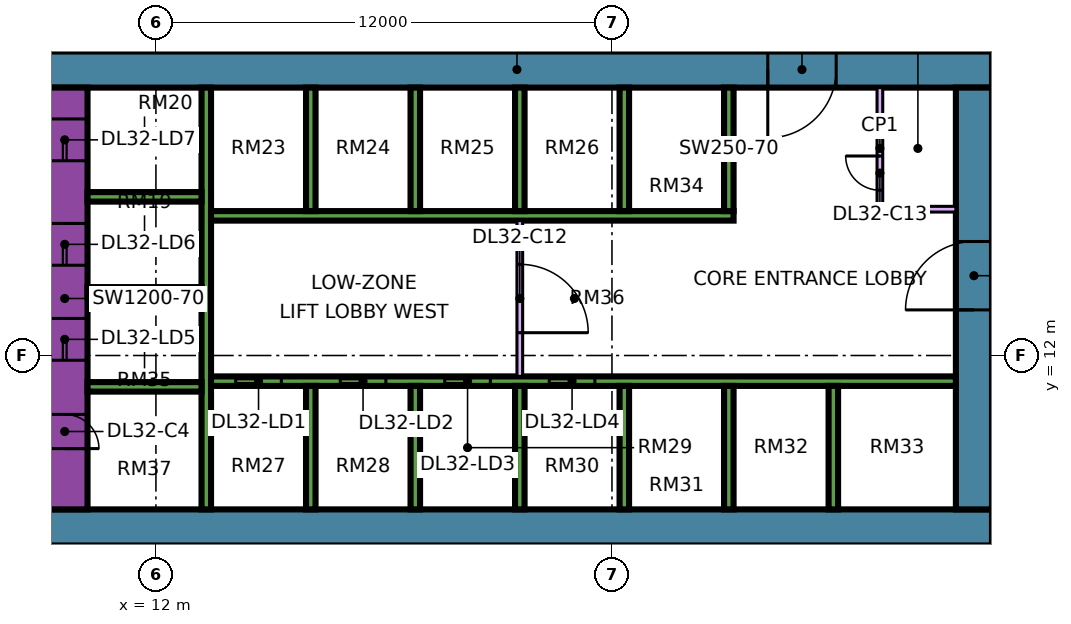
"""IFC4 building model, lengths in metres.
Left out: names, types, materials, properties, quantities, classifications, styles, units other than length and angle.
Written with IfcOpenShell. Run it as: python <this file> out.ifc"""

import sys

from ifc_helpers import new_model, si_unit, direction, frame, frame_2d, origin, place, context, subcontext, project, spatial, rectangle, extrude, element, fill, save


model = new_model("IFC4")
c1 = context("Model", 3, precision=1e-05, world=origin(), true_north=direction((0.0, 1.0)))
c2 = subcontext(c1, "Body", "Model", "MODEL_VIEW")
j1 = project(units=[si_unit("LENGTHUNIT", "METRE"), si_unit("PLANEANGLEUNIT", "RADIAN")], contexts=[c1])
p1 = place(None, origin())
s1 = spatial("IfcSite", under=j1, at=p1, CompositionType="ELEMENT")
p2 = place(p1, origin())
s2 = spatial("IfcBuilding", under=s1, at=p2, CompositionType="ELEMENT")
p3 = place(p2, frame((0.0, 0.0, 136.9)))
s3 = spatial("IfcBuildingStorey", under=s2, at=p3, CompositionType="ELEMENT", Elevation=136.9)
p4 = place(p3, frame((9.0, 7.475, 0.0), z_axis=(0.0, 0.0, 1.0), x_axis=(1.0, 0.0, 0.0)))
e1 = element("IfcWall", 1, at=p4, inside=s3, PredefinedType="SHEAR", context=c2, shape_type="SweptSolid", body=[
    extrude(rectangle(XDim=25.0, YDim=0.95, at=frame_2d((12.5, 0.0))), origin(), (0.0, 0.0, 1.0), 3.75),
])
p5 = place(p3, frame((9.0, 19.525, 0.0), z_axis=(0.0, 0.0, 1.0), x_axis=(1.0, 0.0, 0.0)))
e2 = element("IfcWall", 2, at=p5, inside=s3, PredefinedType="SHEAR", context=c2, shape_type="SweptSolid", body=[
    extrude(rectangle(XDim=25.0, YDim=0.95, at=frame_2d((12.5, 0.0))), origin(), (0.0, 0.0, 1.0), 3.75),
])
p6 = place(p5, frame((19.1, 0.0, 0.0)))
e3 = element("IfcOpeningElement", 3, at=p6, cuts=e2, PredefinedType="OPENING", context=c2, shape_type="SweptSolid", body=[
    extrude(rectangle(XDim=1.8, YDim=2.4, at=frame_2d((0.9, 1.2))), frame((0.0, 0.485, 0.0), z_axis=(0.0, -1.0, 0.0), x_axis=(1.0, 0.0, 0.0)), (0.0, 0.0, 1.0), 0.97),
])
p7 = place(p3, frame((9.6, 7.95, 0.0), z_axis=(0.0, 0.0, 1.0), x_axis=(0.0, 1.0, 0.0)))
e4 = element("IfcWall", 4, at=p7, inside=s3, PredefinedType="SHEAR", context=c2, shape_type="SweptSolid", body=[
    extrude(rectangle(XDim=11.1, YDim=1.2, at=frame_2d((5.55, 0.0))), origin(), (0.0, 0.0, 1.0), 3.75),
])
p8 = place(p7, frame((3.925, 0.0, 0.0)))
e5 = element("IfcOpeningElement", 5, at=p8, cuts=e4, PredefinedType="OPENING", context=c2, shape_type="SweptSolid", body=[
    extrude(rectangle(XDim=1.1, YDim=2.2, at=frame_2d((0.55, 1.1))), frame((0.0, 0.61, 0.0), z_axis=(0.0, -1.0, 0.0), x_axis=(1.0, 0.0, 0.0)), (0.0, 0.0, 1.0), 1.22),
])
p9 = place(p7, frame((6.425, 0.0, 0.0)))
e6 = element("IfcOpeningElement", 6, at=p9, cuts=e4, PredefinedType="OPENING", context=c2, shape_type="SweptSolid", body=[
    extrude(rectangle(XDim=1.1, YDim=2.2, at=frame_2d((0.55, 1.1))), frame((0.0, 0.61, 0.0), z_axis=(0.0, -1.0, 0.0), x_axis=(1.0, 0.0, 0.0)), (0.0, 0.0, 1.0), 1.22),
])
p10 = place(p7, frame((9.175, 0.0, 0.0)))
e7 = element("IfcOpeningElement", 7, at=p10, cuts=e4, PredefinedType="OPENING", context=c2, shape_type="SweptSolid", body=[
    extrude(rectangle(XDim=1.1, YDim=2.2, at=frame_2d((0.55, 1.1))), frame((0.0, 0.61, 0.0), z_axis=(0.0, -1.0, 0.0), x_axis=(1.0, 0.0, 0.0)), (0.0, 0.0, 1.0), 1.22),
])
p11 = place(p7, frame((1.6, 0.0, 0.0)))
e8 = element("IfcOpeningElement", 8, at=p11, cuts=e4, PredefinedType="OPENING", context=c2, shape_type="SweptSolid", body=[
    extrude(rectangle(XDim=0.9, YDim=2.1, at=frame_2d((0.45, 1.05))), frame((0.0, 0.61, 0.0), z_axis=(0.0, -1.0, 0.0), x_axis=(1.0, 0.0, 0.0)), (0.0, 0.0, 1.0), 1.22),
])
p12 = place(p3, frame((33.525, 7.95, 0.0), z_axis=(0.0, 0.0, 1.0), x_axis=(0.0, 1.0, 0.0)))
e9 = element("IfcWall", 9, at=p12, inside=s3, PredefinedType="SHEAR", context=c2, shape_type="SweptSolid", body=[
    extrude(rectangle(XDim=11.1, YDim=0.95, at=frame_2d((5.55, 0.0))), origin(), (0.0, 0.0, 1.0), 3.75),
])
p13 = place(p12, frame((5.25, 0.0, 0.0)))
e10 = element("IfcOpeningElement", 10, at=p13, cuts=e9, PredefinedType="OPENING", context=c2, shape_type="SweptSolid", body=[
    extrude(rectangle(XDim=1.8, YDim=2.4, at=frame_2d((0.9, 1.2))), frame((0.0, 0.485, 0.0), z_axis=(0.0, -1.0, 0.0), x_axis=(1.0, 0.0, 0.0)), (0.0, 0.0, 1.0), 0.97),
])
p14 = place(p3, frame((13.325, 7.95, 0.0), z_axis=(0.0, 0.0, 1.0), x_axis=(0.0, 1.0, 0.0)))
e11 = element("IfcWall", 11, at=p14, inside=s3, PredefinedType="SHEAR", context=c2, shape_type="SweptSolid", body=[
    extrude(rectangle(XDim=11.1, YDim=0.25, at=frame_2d((5.55, 0.0))), origin(), (0.0, 0.0, 1.0), 3.75),
])
p15 = place(p3, frame((13.45, 11.325, 0.0), z_axis=(0.0, 0.0, 1.0), x_axis=(1.0, 0.0, 0.0)))
e12 = element("IfcWall", 12, at=p15, inside=s3, PredefinedType="SHEAR", context=c2, shape_type="SweptSolid", body=[
    extrude(rectangle(XDim=19.6, YDim=0.25, at=frame_2d((9.8, 0.0))), origin(), (0.0, 0.0, 1.0), 3.75),
])
p16 = place(p15, frame((0.65, 0.0, 0.0)))
e13 = element("IfcOpeningElement", 13, at=p16, cuts=e12, PredefinedType="OPENING", context=c2, shape_type="SweptSolid", body=[
    extrude(rectangle(XDim=1.2, YDim=2.2, at=frame_2d((0.6, 1.1))), frame((0.0, 0.135, 0.0), z_axis=(0.0, -1.0, 0.0), x_axis=(1.0, 0.0, 0.0)), (0.0, 0.0, 1.0), 0.27),
])
p17 = place(p15, frame((3.4, 0.0, 0.0)))
e14 = element("IfcOpeningElement", 14, at=p17, cuts=e12, PredefinedType="OPENING", context=c2, shape_type="SweptSolid", body=[
    extrude(rectangle(XDim=1.2, YDim=2.2, at=frame_2d((0.6, 1.1))), frame((0.0, 0.135, 0.0), z_axis=(0.0, -1.0, 0.0), x_axis=(1.0, 0.0, 0.0)), (0.0, 0.0, 1.0), 0.27),
])
p18 = place(p15, frame((6.15, 0.0, 0.0)))
e15 = element("IfcOpeningElement", 15, at=p18, cuts=e12, PredefinedType="OPENING", context=c2, shape_type="SweptSolid", body=[
    extrude(rectangle(XDim=1.2, YDim=2.2, at=frame_2d((0.6, 1.1))), frame((0.0, 0.135, 0.0), z_axis=(0.0, -1.0, 0.0), x_axis=(1.0, 0.0, 0.0)), (0.0, 0.0, 1.0), 0.27),
])
p19 = place(p15, frame((8.9, 0.0, 0.0)))
e16 = element("IfcOpeningElement", 16, at=p19, cuts=e12, PredefinedType="OPENING", context=c2, shape_type="SweptSolid", body=[
    extrude(rectangle(XDim=1.2, YDim=2.2, at=frame_2d((0.6, 1.1))), frame((0.0, 0.135, 0.0), z_axis=(0.0, -1.0, 0.0), x_axis=(1.0, 0.0, 0.0)), (0.0, 0.0, 1.0), 0.27),
])
p20 = place(p3, frame((13.45, 15.675, 0.0), z_axis=(0.0, 0.0, 1.0), x_axis=(1.0, 0.0, 0.0)))
e17 = element("IfcWall", 17, at=p20, inside=s3, PredefinedType="SHEAR", context=c2, shape_type="SweptSolid", body=[
    extrude(rectangle(XDim=13.75, YDim=0.25, at=frame_2d((6.875, 0.0))), origin(), (0.0, 0.0, 1.0), 3.75),
])
for number, where, z_axis, x_axis in (
    (18, (10.2, 11.175, 0.0), (0.0, 0.0, 1.0), (1.0, 0.0, 0.0)),
    (19, (10.2, 13.675, 0.0), (0.0, 0.0, 1.0), (1.0, 0.0, 0.0)),
    (20, (10.2, 16.175, 0.0), (0.0, 0.0, 1.0), (1.0, 0.0, 0.0)),
):
    element("IfcWall", number, at=place(p3, frame(where, z_axis=z_axis, x_axis=x_axis)), inside=s3, PredefinedType="SHEAR", context=c2, shape_type="SweptSolid", body=[
        extrude(rectangle(XDim=3.0, YDim=0.25, at=frame_2d((1.5, 0.0))), origin(), (0.0, 0.0, 1.0), 3.75),
    ])
for number, where, z_axis, x_axis in (
    (21, (16.075, 7.95, 0.0), (0.0, 0.0, 1.0), (0.0, 1.0, 0.0)),
    (22, (18.825, 7.95, 0.0), (0.0, 0.0, 1.0), (0.0, 1.0, 0.0)),
    (23, (21.575, 7.95, 0.0), (0.0, 0.0, 1.0), (0.0, 1.0, 0.0)),
    (24, (24.325, 7.95, 0.0), (0.0, 0.0, 1.0), (0.0, 1.0, 0.0)),
    (25, (27.075, 7.95, 0.0), (0.0, 0.0, 1.0), (0.0, 1.0, 0.0)),
    (26, (29.825, 7.95, 0.0), (0.0, 0.0, 1.0), (0.0, 1.0, 0.0)),
    (27, (16.075, 15.8, 0.0), (0.0, 0.0, 1.0), (0.0, 1.0, 0.0)),
    (28, (18.825, 15.8, 0.0), (0.0, 0.0, 1.0), (0.0, 1.0, 0.0)),
    (29, (21.575, 15.8, 0.0), (0.0, 0.0, 1.0), (0.0, 1.0, 0.0)),
    (30, (24.325, 15.8, 0.0), (0.0, 0.0, 1.0), (0.0, 1.0, 0.0)),
    (31, (27.075, 15.8, 0.0), (0.0, 0.0, 1.0), (0.0, 1.0, 0.0)),
):
    element("IfcWall", number, at=place(p3, frame(where, z_axis=z_axis, x_axis=x_axis)), inside=s3, PredefinedType="SHEAR", context=c2, shape_type="SweptSolid", body=[
        extrude(rectangle(XDim=3.25, YDim=0.25, at=frame_2d((1.625, 0.0))), origin(), (0.0, 0.0, 1.0), 3.75),
    ])
p21 = place(p3, frame((-1.447, 12.553, 0.0), z_axis=(0.0, 0.0, 1.0), x_axis=(0.707106781187, -0.707106781187, 0.0)))
e32 = element("IfcWall", 32, at=p21, inside=s3, PredefinedType="SOLIDWALL", context=c2, shape_type="SweptSolid", body=[
    extrude(rectangle(XDim=19.799, YDim=0.15, at=frame_2d((9.899, 0.0))), origin(), (0.0, 0.0, 1.0), 3.3),
])
p22 = place(p21, frame((2.212, 0.0, 0.45)))
e33 = element("IfcOpeningElement", 33, at=p22, cuts=e32, PredefinedType="OPENING", context=c2, shape_type="SweptSolid", body=[
    extrude(rectangle(XDim=3.0, YDim=2.4, at=frame_2d((1.5, 1.2))), frame((0.0, 0.085, 0.0), z_axis=(0.0, -1.0, 0.0), x_axis=(1.0, 0.0, 0.0)), (0.0, 0.0, 1.0), 0.17),
])
p23 = place(p21, frame((10.216, 0.0, 0.45)))
e34 = element("IfcOpeningElement", 34, at=p23, cuts=e32, PredefinedType="OPENING", context=c2, shape_type="SweptSolid", body=[
    extrude(rectangle(XDim=3.0, YDim=2.4, at=frame_2d((1.5, 1.2))), frame((0.0, 0.085, 0.0), z_axis=(0.0, -1.0, 0.0), x_axis=(1.0, 0.0, 0.0)), (0.0, 0.0, 1.0), 0.17),
])
p24 = place(p3, frame((21.575, 11.45, 0.0), z_axis=(0.0, 0.0, 1.0), x_axis=(0.0, 1.0, 0.0)))
e35 = element("IfcWall", 35, at=p24, inside=s3, PredefinedType="PARTITIONING", context=c2, shape_type="SweptSolid", body=[
    extrude(rectangle(XDim=4.1, YDim=0.15, at=frame_2d((2.05, 0.0))), origin(), (0.0, 0.0, 1.0), 3.3),
])
p25 = place(p24, frame((1.15, 0.0, 0.0)))
e36 = element("IfcOpeningElement", 36, at=p25, cuts=e35, PredefinedType="OPENING", context=c2, shape_type="SweptSolid", body=[
    extrude(rectangle(XDim=1.8, YDim=2.4, at=frame_2d((0.9, 1.2))), frame((0.0, 0.085, 0.0), z_axis=(0.0, -1.0, 0.0), x_axis=(1.0, 0.0, 0.0)), (0.0, 0.0, 1.0), 0.17),
])
p26 = place(p3, frame((31.05, 15.85, 0.0), z_axis=(0.0, 0.0, 1.0), x_axis=(0.0, 1.0, 0.0)))
e37 = element("IfcWall", 37, at=p26, inside=s3, PredefinedType="PARTITIONING", context=c2, shape_type="SweptSolid", body=[
    extrude(rectangle(XDim=3.2, YDim=0.15, at=frame_2d((1.6, 0.0))), origin(), (0.0, 0.0, 1.0), 3.3),
])
p27 = place(p26, frame((0.5, 0.0, 0.0)))
e38 = element("IfcOpeningElement", 38, at=p27, cuts=e37, PredefinedType="OPENING", context=c2, shape_type="SweptSolid", body=[
    extrude(rectangle(XDim=0.9, YDim=2.1, at=frame_2d((0.45, 1.05))), frame((0.0, 0.085, 0.0), z_axis=(0.0, -1.0, 0.0), x_axis=(1.0, 0.0, 0.0)), (0.0, 0.0, 1.0), 0.17),
])
p28 = place(p3, frame((31.05, 15.85, 0.0), z_axis=(0.0, 0.0, 1.0), x_axis=(1.0, 0.0, 0.0)))
e39 = element("IfcWall", 39, at=p28, inside=s3, PredefinedType="PARTITIONING", context=c2, shape_type="SweptSolid", body=[
    extrude(rectangle(XDim=2.0, YDim=0.15, at=frame_2d((1.0, 0.0))), origin(), (0.0, 0.0, 1.0), 3.3),
])
p29 = place(p16, origin())
e40 = element("IfcDoor", 40, at=p29, inside=s3, OperationType="DOUBLE_DOOR_SLIDING", PredefinedType="DOOR", context=c2, shape_type="SweptSolid", body=[
    extrude(rectangle(XDim=1.2, YDim=2.2, at=frame_2d((0.6, 1.1))), frame((0.0, 0.025, 0.0), z_axis=(0.0, -1.0, 0.0), x_axis=(1.0, 0.0, 0.0)), (0.0, 0.0, 1.0), 0.05),
])
fill(e13, e40)
p30 = place(p17, origin())
e41 = element("IfcDoor", 41, at=p30, inside=s3, OperationType="DOUBLE_DOOR_SLIDING", PredefinedType="DOOR", context=c2, shape_type="SweptSolid", body=[
    extrude(rectangle(XDim=1.2, YDim=2.2, at=frame_2d((0.6, 1.1))), frame((0.0, 0.025, 0.0), z_axis=(0.0, -1.0, 0.0), x_axis=(1.0, 0.0, 0.0)), (0.0, 0.0, 1.0), 0.05),
])
fill(e14, e41)
p31 = place(p18, origin())
e42 = element("IfcDoor", 42, at=p31, inside=s3, OperationType="DOUBLE_DOOR_SLIDING", PredefinedType="DOOR", context=c2, shape_type="SweptSolid", body=[
    extrude(rectangle(XDim=1.2, YDim=2.2, at=frame_2d((0.6, 1.1))), frame((0.0, 0.025, 0.0), z_axis=(0.0, -1.0, 0.0), x_axis=(1.0, 0.0, 0.0)), (0.0, 0.0, 1.0), 0.05),
])
fill(e15, e42)
p32 = place(p19, origin())
e43 = element("IfcDoor", 43, at=p32, inside=s3, OperationType="DOUBLE_DOOR_SLIDING", PredefinedType="DOOR", context=c2, shape_type="SweptSolid", body=[
    extrude(rectangle(XDim=1.2, YDim=2.2, at=frame_2d((0.6, 1.1))), frame((0.0, 0.025, 0.0), z_axis=(0.0, -1.0, 0.0), x_axis=(1.0, 0.0, 0.0)), (0.0, 0.0, 1.0), 0.05),
])
fill(e16, e43)
p33 = place(p8, origin())
e44 = element("IfcDoor", 44, at=p33, inside=s3, OperationType="DOUBLE_DOOR_SLIDING", PredefinedType="DOOR", context=c2, shape_type="SweptSolid", body=[
    extrude(rectangle(XDim=1.1, YDim=2.2, at=frame_2d((0.55, 1.1))), frame((0.0, 0.025, 0.0), z_axis=(0.0, -1.0, 0.0), x_axis=(1.0, 0.0, 0.0)), (0.0, 0.0, 1.0), 0.05),
])
fill(e5, e44)
p34 = place(p9, origin())
e45 = element("IfcDoor", 45, at=p34, inside=s3, OperationType="DOUBLE_DOOR_SLIDING", PredefinedType="DOOR", context=c2, shape_type="SweptSolid", body=[
    extrude(rectangle(XDim=1.1, YDim=2.2, at=frame_2d((0.55, 1.1))), frame((0.0, 0.025, 0.0), z_axis=(0.0, -1.0, 0.0), x_axis=(1.0, 0.0, 0.0)), (0.0, 0.0, 1.0), 0.05),
])
fill(e6, e45)
p35 = place(p10, origin())
e46 = element("IfcDoor", 46, at=p35, inside=s3, OperationType="DOUBLE_DOOR_SLIDING", PredefinedType="DOOR", context=c2, shape_type="SweptSolid", body=[
    extrude(rectangle(XDim=1.1, YDim=2.2, at=frame_2d((0.55, 1.1))), frame((0.0, 0.025, 0.0), z_axis=(0.0, -1.0, 0.0), x_axis=(1.0, 0.0, 0.0)), (0.0, 0.0, 1.0), 0.05),
])
fill(e7, e46)
p36 = place(p13, origin())
e47 = element("IfcDoor", 47, at=p36, inside=s3, OperationType="DOUBLE_DOOR_SINGLE_SWING", PredefinedType="DOOR", context=c2, shape_type="SweptSolid", body=[
    extrude(rectangle(XDim=1.8, YDim=2.4, at=frame_2d((0.9, 1.2))), frame((0.0, 0.025, 0.0), z_axis=(0.0, -1.0, 0.0), x_axis=(1.0, 0.0, 0.0)), (0.0, 0.0, 1.0), 0.05),
])
fill(e10, e47)
p37 = place(p6, frame((1.8, 0.0, 0.0), z_axis=(0.0, 0.0, 1.0), x_axis=(-1.0, 0.0, 0.0)))
e48 = element("IfcDoor", 48, at=p37, inside=s3, OperationType="DOUBLE_DOOR_SINGLE_SWING", PredefinedType="DOOR", context=c2, shape_type="SweptSolid", body=[
    extrude(rectangle(XDim=1.8, YDim=2.4, at=frame_2d((0.9, 1.2))), frame((0.0, 0.025, 0.0), z_axis=(0.0, -1.0, 0.0), x_axis=(1.0, 0.0, 0.0)), (0.0, 0.0, 1.0), 0.05),
])
fill(e3, e48)
p38 = place(p11, frame((0.9, 0.0, 0.0), z_axis=(0.0, 0.0, 1.0), x_axis=(-1.0, 0.0, 0.0)))
e49 = element("IfcDoor", 49, at=p38, inside=s3, OperationType="SINGLE_SWING_LEFT", PredefinedType="DOOR", context=c2, shape_type="SweptSolid", body=[
    extrude(rectangle(XDim=0.9, YDim=2.1, at=frame_2d((0.45, 1.05))), frame((0.0, 0.025, 0.0), z_axis=(0.0, -1.0, 0.0), x_axis=(1.0, 0.0, 0.0)), (0.0, 0.0, 1.0), 0.05),
])
fill(e8, e49)
p39 = place(p25, frame((1.8, 0.0, 0.0), z_axis=(0.0, 0.0, 1.0), x_axis=(-1.0, 0.0, 0.0)))
e50 = element("IfcDoor", 50, at=p39, inside=s3, OperationType="DOUBLE_DOOR_SINGLE_SWING", PredefinedType="DOOR", context=c2, shape_type="SweptSolid", body=[
    extrude(rectangle(XDim=1.8, YDim=2.4, at=frame_2d((0.9, 1.2))), frame((0.0, 0.025, 0.0), z_axis=(0.0, -1.0, 0.0), x_axis=(1.0, 0.0, 0.0)), (0.0, 0.0, 1.0), 0.05),
])
fill(e36, e50)
p40 = place(p27, frame((0.9, 0.0, 0.0), z_axis=(0.0, 0.0, 1.0), x_axis=(-1.0, 0.0, 0.0)))
e51 = element("IfcDoor", 51, at=p40, inside=s3, OperationType="SINGLE_SWING_RIGHT", PredefinedType="DOOR", context=c2, shape_type="SweptSolid", body=[
    extrude(rectangle(XDim=0.9, YDim=2.1, at=frame_2d((0.45, 1.05))), frame((0.0, 0.025, 0.0), z_axis=(0.0, -1.0, 0.0), x_axis=(1.0, 0.0, 0.0)), (0.0, 0.0, 1.0), 0.05),
])
fill(e38, e51)
save(model, sys.argv[1])
